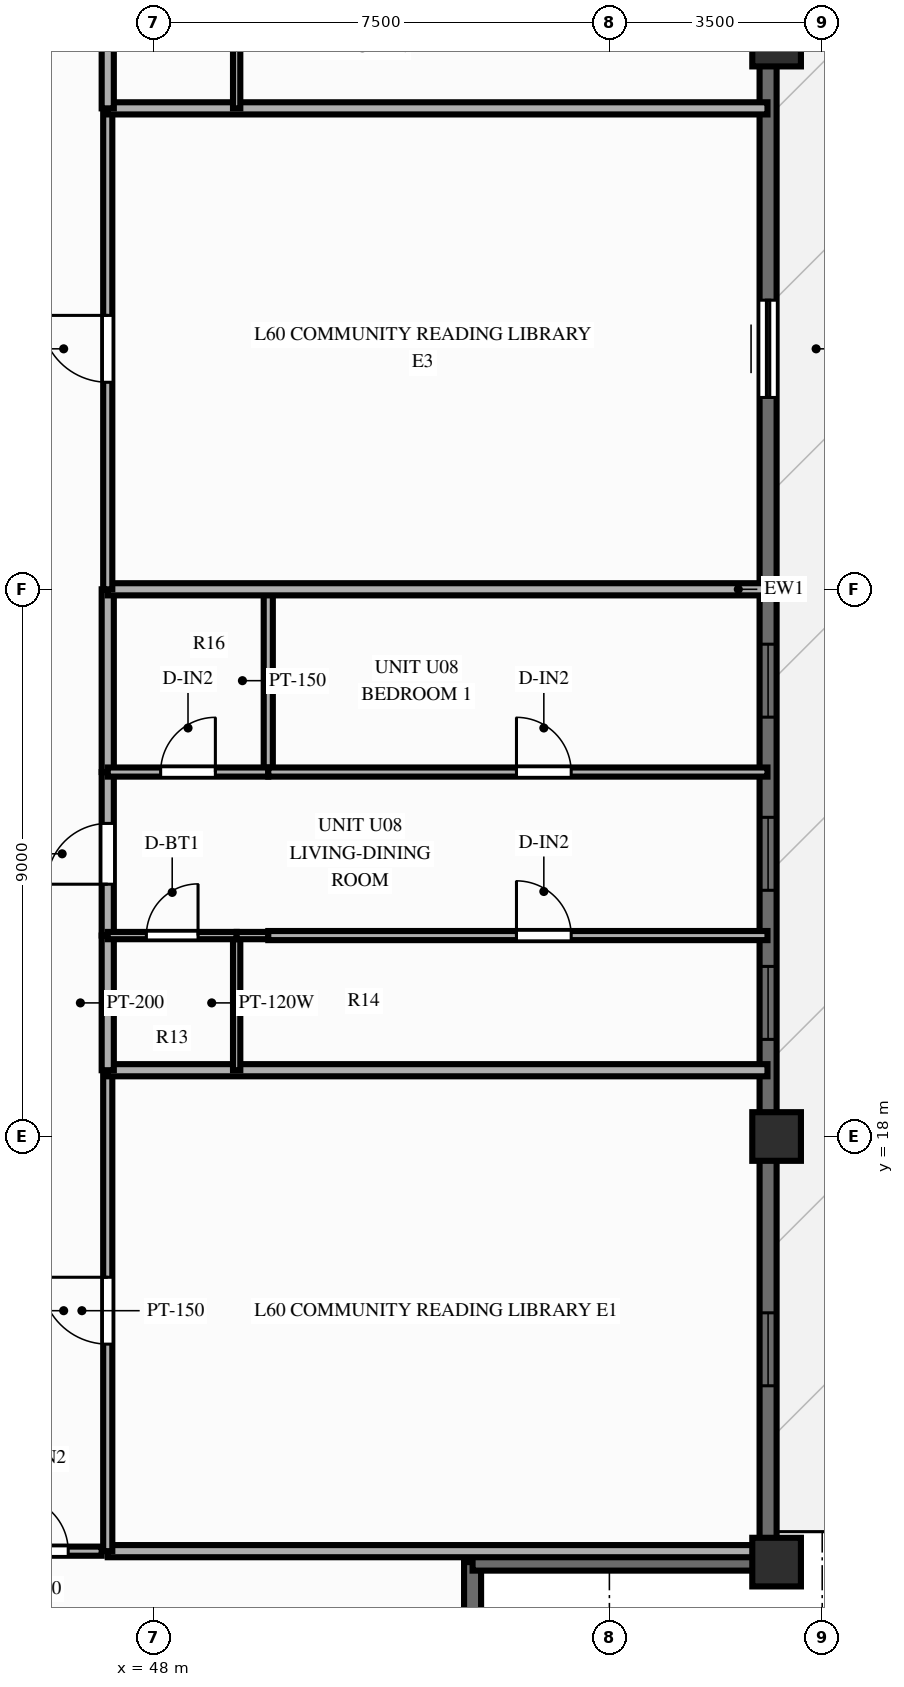
"""IFC4 building model, lengths in metres.
Left out: names, types, materials, properties, quantities, classifications, styles, units other than length and angle.
Written with IfcOpenShell. Run it as: python <this file> out.ifc"""

import sys

from ifc_helpers import new_model, si_unit, direction, frame, frame_2d, origin, origin_2d, place, context, subcontext, project, spatial, rectangle, extrude, source, transform, mapped, element, fill, save


model = new_model("IFC4")
c1 = context("Model", 3, precision=1e-05, world=origin(), true_north=direction((0.0, 1.0)))
c2 = subcontext(c1, "Body", "Model", "MODEL_VIEW")
j1 = project(units=[si_unit("LENGTHUNIT", "METRE"), si_unit("PLANEANGLEUNIT", "RADIAN")], contexts=[c1])
p1 = place(None, origin())
s1 = spatial("IfcSite", under=j1, at=p1, CompositionType="ELEMENT")
p2 = place(p1, origin())
s2 = spatial("IfcBuilding", under=s1, at=p2, CompositionType="ELEMENT")
p3 = place(p2, frame((0.0, 0.0, 192.7)))
s3 = spatial("IfcBuildingStorey", under=s2, at=p3, CompositionType="ELEMENT", Elevation=192.7)
m1 = source(origin(), c2, "Body", "SweptSolid", [
    extrude(rectangle(XDim=0.8, YDim=0.8, at=origin_2d()), origin(), (0.0, 0.0, 1.0), 3.9),
])
for number, where, z_axis, x_axis in (
    (1, (58.25, 11.0, 0.0), (0.0, 0.0, 1.0), (1.0, 0.0, 0.0)),
    (2, (58.25, 18.0, 0.0), (0.0, 0.0, 1.0), (1.0, 0.0, 0.0)),
    (3, (58.25, 36.0, 0.0), (0.0, 0.0, 1.0), (1.0, 0.0, 0.0)),
):
    element("IfcColumn", number, at=place(p3, frame(where, z_axis=z_axis, x_axis=x_axis)), inside=s3, PredefinedType="COLUMN", context=c2, shape_type="MappedRepresentation", body=[
        mapped(m1, transform((0.0, 0.0, 0.0), scale=1.0)),
    ])
p4 = place(p3, frame((58.11, 11.0, 0.0), z_axis=(0.0, 0.0, 1.0), x_axis=(0.0, 1.0, 0.0)))
e4 = element("IfcWall", 4, at=p4, inside=s3, PredefinedType="SOLIDWALL", context=c2, shape_type="SweptSolid", body=[
    extrude(rectangle(XDim=32.0, YDim=0.28, at=frame_2d((16.0, 0.0))), origin(), (0.0, 0.0, 1.0), 2.44),
])
p5 = place(p4, frame((2.9, 0.0, 0.25)))
e5 = element("IfcOpeningElement", 5, at=p5, cuts=e4, PredefinedType="OPENING", context=c2, shape_type="SweptSolid", body=[
    extrude(rectangle(XDim=1.2, YDim=1.5, at=frame_2d((0.6, 0.75))), frame((0.0, 0.152, 0.0), z_axis=(0.0, -1.0, 0.0), x_axis=(1.0, 0.0, 0.0)), (0.0, 0.0, 1.0), 0.304),
])
p6 = place(p4, frame((8.597, 0.0, 0.25)))
e6 = element("IfcOpeningElement", 6, at=p6, cuts=e4, PredefinedType="OPENING", context=c2, shape_type="SweptSolid", body=[
    extrude(rectangle(XDim=1.2, YDim=1.5, at=frame_2d((0.6, 0.75))), frame((0.0, 0.152, 0.0), z_axis=(0.0, -1.0, 0.0), x_axis=(1.0, 0.0, 0.0)), (0.0, 0.0, 1.0), 0.304),
])
p7 = place(p4, frame((11.05, 0.0, 0.25)))
e7 = element("IfcOpeningElement", 7, at=p7, cuts=e4, PredefinedType="OPENING", context=c2, shape_type="SweptSolid", body=[
    extrude(rectangle(XDim=1.2, YDim=1.5, at=frame_2d((0.6, 0.75))), frame((0.0, 0.152, 0.0), z_axis=(0.0, -1.0, 0.0), x_axis=(1.0, 0.0, 0.0)), (0.0, 0.0, 1.0), 0.304),
])
p8 = place(p4, frame((13.897, 0.0, 0.25)))
e8 = element("IfcOpeningElement", 8, at=p8, cuts=e4, PredefinedType="OPENING", context=c2, shape_type="SweptSolid", body=[
    extrude(rectangle(XDim=1.2, YDim=1.5, at=frame_2d((0.6, 0.75))), frame((0.0, 0.152, 0.0), z_axis=(0.0, -1.0, 0.0), x_axis=(1.0, 0.0, 0.0)), (0.0, 0.0, 1.0), 0.304),
])
p9 = place(p4, frame((20.755, 0.0, 0.0), z_axis=(0.0, 0.0, 1.0), x_axis=(-1.0, 0.0, 0.0)))
e9 = element("IfcOpeningElement", 9, at=p9, cuts=e4, PredefinedType="OPENING", context=c2, shape_type="SweptSolid", body=[
    extrude(rectangle(XDim=1.6, YDim=2.15, at=frame_2d((0.8, 1.075))), frame((0.0, 0.152, 0.0), z_axis=(0.0, -1.0, 0.0), x_axis=(1.0, 0.0, 0.0)), (0.0, 0.0, 1.0), 0.304),
])
p10 = place(p4, frame((26.967, 0.0, 0.25)))
e10 = element("IfcOpeningElement", 10, at=p10, cuts=e4, PredefinedType="OPENING", context=c2, shape_type="SweptSolid", body=[
    extrude(rectangle(XDim=1.2, YDim=1.5, at=frame_2d((0.6, 0.75))), frame((0.0, 0.152, 0.0), z_axis=(0.0, -1.0, 0.0), x_axis=(1.0, 0.0, 0.0)), (0.0, 0.0, 1.0), 0.304),
])
p11 = place(p4, frame((29.687, 0.0, 0.25)))
e11 = element("IfcOpeningElement", 11, at=p11, cuts=e4, PredefinedType="OPENING", context=c2, shape_type="SweptSolid", body=[
    extrude(rectangle(XDim=1.2, YDim=1.5, at=frame_2d((0.6, 0.75))), frame((0.0, 0.152, 0.0), z_axis=(0.0, -1.0, 0.0), x_axis=(1.0, 0.0, 0.0)), (0.0, 0.0, 1.0), 0.304),
])
for number, where, z_axis, x_axis in (
    (12, (53.25, 6.08, 0.0), (0.0, 0.0, 1.0), (0.0, 1.0, 0.0)),
    (13, (53.25, 11.0, 0.0), (0.0, 0.0, 1.0), (1.0, 0.0, 0.0)),
):
    element("IfcWall", number, at=place(p3, frame(where, z_axis=z_axis, x_axis=x_axis)), inside=s3, PredefinedType="SOLIDWALL", context=c2, shape_type="SweptSolid", body=[
        extrude(rectangle(XDim=4.92, YDim=0.28, at=frame_2d((2.46, 0.0))), origin(), (0.0, 0.0, 1.0), 2.44),
    ])
p12 = place(p3, frame((44.82, 11.18, 0.0), z_axis=(0.0, 0.0, 1.0), x_axis=(1.0, 0.0, 0.0)))
e14 = element("IfcWall", 14, at=p12, inside=s3, PredefinedType="PARTITIONING", context=c2, shape_type="SweptSolid", body=[
    extrude(rectangle(XDim=2.33, YDim=0.15, at=frame_2d((1.165, 0.0))), origin(), (0.0, 0.0, 1.0), 2.24),
])
p13 = place(p12, frame((0.88, 0.0, 0.0)))
e15 = element("IfcOpeningElement", 15, at=p13, cuts=e14, PredefinedType="OPENING", context=c2, shape_type="SweptSolid", body=[
    extrude(rectangle(XDim=0.9, YDim=2.1, at=frame_2d((0.45, 1.05))), frame((0.0, 0.087, 0.0), z_axis=(0.0, -1.0, 0.0), x_axis=(1.0, 0.0, 0.0)), (0.0, 0.0, 1.0), 0.174),
])
p14 = place(p3, frame((47.25, 11.18, 0.0), z_axis=(0.0, 0.0, 1.0), x_axis=(1.0, 0.0, 0.0)))
e16 = element("IfcWall", 16, at=p14, inside=s3, PredefinedType="PARTITIONING", context=c2, shape_type="SweptSolid", body=[
    extrude(rectangle(XDim=10.85, YDim=0.2, at=frame_2d((5.425, 0.0))), origin(), (0.0, 0.0, 1.0), 2.24),
])
p15 = place(p3, frame((47.25, 11.18, 0.0), z_axis=(0.0, 0.0, 1.0), x_axis=(0.0, 1.0, 0.0)))
e17 = element("IfcWall", 17, at=p15, inside=s3, PredefinedType="PARTITIONING", context=c2, shape_type="SweptSolid", body=[
    extrude(rectangle(XDim=7.91, YDim=0.15, at=frame_2d((3.955, 0.0))), origin(), (0.0, 0.0, 1.0), 3.56),
])
p16 = place(p15, frame((3.405, 0.0, 0.0)))
e18 = element("IfcOpeningElement", 18, at=p16, cuts=e17, PredefinedType="OPENING", context=c2, shape_type="SweptSolid", body=[
    extrude(rectangle(XDim=1.1, YDim=2.15, at=frame_2d((0.55, 1.075))), frame((0.0, 0.087, 0.0), z_axis=(0.0, -1.0, 0.0), x_axis=(1.0, 0.0, 0.0)), (0.0, 0.0, 1.0), 0.174),
])
p17 = place(p3, frame((47.25, 19.09, 0.0), z_axis=(0.0, 0.0, 1.0), x_axis=(1.0, 0.0, 0.0)))
e19 = element("IfcWall", 19, at=p17, inside=s3, PredefinedType="PARTITIONING", context=c2, shape_type="SweptSolid", body=[
    extrude(rectangle(XDim=10.85, YDim=0.2, at=frame_2d((5.425, 0.0))), origin(), (0.0, 0.0, 1.0), 3.56),
])
p18 = place(p3, frame((47.25, 19.09, 0.0), z_axis=(0.0, 0.0, 1.0), x_axis=(0.0, 1.0, 0.0)))
e20 = element("IfcWall", 20, at=p18, inside=s3, PredefinedType="PARTITIONING", context=c2, shape_type="SweptSolid", body=[
    extrude(rectangle(XDim=2.215, YDim=0.2, at=frame_2d((1.107, 0.0))), origin(), (0.0, 0.0, 1.0), 3.56),
])
p19 = place(p3, frame((47.25, 21.305, 0.0), z_axis=(0.0, 0.0, 1.0), x_axis=(0.0, 1.0, 0.0)))
e21 = element("IfcWall", 21, at=p19, inside=s3, PredefinedType="PARTITIONING", context=c2, shape_type="SweptSolid", body=[
    extrude(rectangle(XDim=2.689, YDim=0.2, at=frame_2d((1.345, 0.0))), origin(), (0.0, 0.0, 1.0), 3.56),
])
p20 = place(p19, frame((0.845, 0.0, 0.0)))
e22 = element("IfcOpeningElement", 22, at=p20, cuts=e21, PredefinedType="OPENING", context=c2, shape_type="SweptSolid", body=[
    extrude(rectangle(XDim=1.0, YDim=2.15, at=frame_2d((0.5, 1.075))), frame((0.0, 0.112, 0.0), z_axis=(0.0, -1.0, 0.0), x_axis=(1.0, 0.0, 0.0)), (0.0, 0.0, 1.0), 0.224),
])
p21 = place(p3, frame((47.25, 23.994, 0.0), z_axis=(0.0, 0.0, 1.0), x_axis=(0.0, 1.0, 0.0)))
e23 = element("IfcWall", 23, at=p21, inside=s3, PredefinedType="PARTITIONING", context=c2, shape_type="SweptSolid", body=[
    extrude(rectangle(XDim=3.006, YDim=0.2, at=frame_2d((1.503, 0.0))), origin(), (0.0, 0.0, 1.0), 3.56),
])
p22 = place(p3, frame((49.37, 19.09, 0.0), z_axis=(0.0, 0.0, 1.0), x_axis=(0.0, 1.0, 0.0)))
e24 = element("IfcWall", 24, at=p22, inside=s3, PredefinedType="PARTITIONING", context=c2, shape_type="SweptSolid", body=[
    extrude(rectangle(XDim=2.215, YDim=0.12, at=frame_2d((1.107, 0.0))), origin(), (0.0, 0.0, 1.0), 3.56),
])
p23 = place(p3, frame((49.89, 23.994, 0.0), z_axis=(0.0, 0.0, 1.0), x_axis=(0.0, 1.0, 0.0)))
e25 = element("IfcWall", 25, at=p23, inside=s3, PredefinedType="PARTITIONING", context=c2, shape_type="SweptSolid", body=[
    extrude(rectangle(XDim=3.006, YDim=0.15, at=frame_2d((1.503, 0.0))), origin(), (0.0, 0.0, 1.0), 3.56),
])
p24 = place(p3, frame((47.25, 21.305, 0.0), z_axis=(0.0, 0.0, 1.0), x_axis=(1.0, 0.0, 0.0)))
e26 = element("IfcWall", 26, at=p24, inside=s3, PredefinedType="PARTITIONING", context=c2, shape_type="SweptSolid", body=[
    extrude(rectangle(XDim=2.12, YDim=0.12, at=frame_2d((1.06, 0.0))), origin(), (0.0, 0.0, 1.0), 3.56),
])
p25 = place(p24, frame((0.635, 0.0, 0.0)))
e27 = element("IfcOpeningElement", 27, at=p25, cuts=e26, PredefinedType="OPENING", context=c2, shape_type="SweptSolid", body=[
    extrude(rectangle(XDim=0.85, YDim=2.05, at=frame_2d((0.425, 1.025))), frame((0.0, 0.072, 0.0), z_axis=(0.0, -1.0, 0.0), x_axis=(1.0, 0.0, 0.0)), (0.0, 0.0, 1.0), 0.144),
])
p26 = place(p3, frame((49.37, 21.305, 0.0), z_axis=(0.0, 0.0, 1.0), x_axis=(1.0, 0.0, 0.0)))
e28 = element("IfcWall", 28, at=p26, inside=s3, PredefinedType="PARTITIONING", context=c2, shape_type="SweptSolid", body=[
    extrude(rectangle(XDim=0.52, YDim=0.12, at=frame_2d((0.26, 0.0))), origin(), (0.0, 0.0, 1.0), 3.56),
])
p27 = place(p3, frame((49.89, 21.305, 0.0), z_axis=(0.0, 0.0, 1.0), x_axis=(1.0, 0.0, 0.0)))
e29 = element("IfcWall", 29, at=p27, inside=s3, PredefinedType="PARTITIONING", context=c2, shape_type="SweptSolid", body=[
    extrude(rectangle(XDim=8.21, YDim=0.15, at=frame_2d((4.105, 0.0))), origin(), (0.0, 0.0, 1.0), 3.56),
])
p28 = place(p27, frame((4.082, 0.0, 0.0)))
e30 = element("IfcOpeningElement", 30, at=p28, cuts=e29, PredefinedType="OPENING", context=c2, shape_type="SweptSolid", body=[
    extrude(rectangle(XDim=0.9, YDim=2.1, at=frame_2d((0.45, 1.05))), frame((0.0, 0.087, 0.0), z_axis=(0.0, -1.0, 0.0), x_axis=(1.0, 0.0, 0.0)), (0.0, 0.0, 1.0), 0.174),
])
p29 = place(p3, frame((47.25, 23.994, 0.0), z_axis=(0.0, 0.0, 1.0), x_axis=(1.0, 0.0, 0.0)))
e31 = element("IfcWall", 31, at=p29, inside=s3, PredefinedType="PARTITIONING", context=c2, shape_type="SweptSolid", body=[
    extrude(rectangle(XDim=2.64, YDim=0.15, at=frame_2d((1.32, 0.0))), origin(), (0.0, 0.0, 1.0), 3.56),
])
p30 = place(p29, frame((0.87, 0.0, 0.0)))
e32 = element("IfcOpeningElement", 32, at=p30, cuts=e31, PredefinedType="OPENING", context=c2, shape_type="SweptSolid", body=[
    extrude(rectangle(XDim=0.9, YDim=2.1, at=frame_2d((0.45, 1.05))), frame((0.0, 0.087, 0.0), z_axis=(0.0, -1.0, 0.0), x_axis=(1.0, 0.0, 0.0)), (0.0, 0.0, 1.0), 0.174),
])
p31 = place(p3, frame((49.89, 23.994, 0.0), z_axis=(0.0, 0.0, 1.0), x_axis=(1.0, 0.0, 0.0)))
e33 = element("IfcWall", 33, at=p31, inside=s3, PredefinedType="PARTITIONING", context=c2, shape_type="SweptSolid", body=[
    extrude(rectangle(XDim=8.21, YDim=0.15, at=frame_2d((4.105, 0.0))), origin(), (0.0, 0.0, 1.0), 3.56),
])
p32 = place(p31, frame((4.082, 0.0, 0.0)))
e34 = element("IfcOpeningElement", 34, at=p32, cuts=e33, PredefinedType="OPENING", context=c2, shape_type="SweptSolid", body=[
    extrude(rectangle(XDim=0.9, YDim=2.1, at=frame_2d((0.45, 1.05))), frame((0.0, 0.087, 0.0), z_axis=(0.0, -1.0, 0.0), x_axis=(1.0, 0.0, 0.0)), (0.0, 0.0, 1.0), 0.174),
])
p33 = place(p3, frame((47.25, 27.0, 0.0), z_axis=(0.0, 0.0, 1.0), x_axis=(1.0, 0.0, 0.0)))
e35 = element("IfcWall", 35, at=p33, inside=s3, PredefinedType="PARTITIONING", context=c2, shape_type="SweptSolid", body=[
    extrude(rectangle(XDim=10.85, YDim=0.2, at=frame_2d((5.425, 0.0))), origin(), (0.0, 0.0, 1.0), 3.56),
])
p34 = place(p3, frame((47.25, 27.0, 0.0), z_axis=(0.0, 0.0, 1.0), x_axis=(0.0, 1.0, 0.0)))
e36 = element("IfcWall", 36, at=p34, inside=s3, PredefinedType="PARTITIONING", context=c2, shape_type="SweptSolid", body=[
    extrude(rectangle(XDim=7.91, YDim=0.15, at=frame_2d((3.955, 0.0))), origin(), (0.0, 0.0, 1.0), 3.56),
])
p35 = place(p34, frame((3.405, 0.0, 0.0)))
e37 = element("IfcOpeningElement", 37, at=p35, cuts=e36, PredefinedType="OPENING", context=c2, shape_type="SweptSolid", body=[
    extrude(rectangle(XDim=1.1, YDim=2.15, at=frame_2d((0.55, 1.075))), frame((0.0, 0.087, 0.0), z_axis=(0.0, -1.0, 0.0), x_axis=(1.0, 0.0, 0.0)), (0.0, 0.0, 1.0), 0.174),
])
p36 = place(p3, frame((47.25, 34.91, 0.0), z_axis=(0.0, 0.0, 1.0), x_axis=(1.0, 0.0, 0.0)))
e38 = element("IfcWall", 38, at=p36, inside=s3, PredefinedType="PARTITIONING", context=c2, shape_type="SweptSolid", body=[
    extrude(rectangle(XDim=10.85, YDim=0.2, at=frame_2d((5.425, 0.0))), origin(), (0.0, 0.0, 1.0), 3.56),
])
p37 = place(p3, frame((47.25, 34.91, 0.0), z_axis=(0.0, 0.0, 1.0), x_axis=(0.0, 1.0, 0.0)))
e39 = element("IfcWall", 39, at=p37, inside=s3, PredefinedType="PARTITIONING", context=c2, shape_type="SweptSolid", body=[
    extrude(rectangle(XDim=2.41, YDim=0.2, at=frame_2d((1.205, 0.0))), origin(), (0.0, 0.0, 1.0), 3.56),
])
p38 = place(p3, frame((49.37, 34.91, 0.0), z_axis=(0.0, 0.0, 1.0), x_axis=(0.0, 1.0, 0.0)))
e40 = element("IfcWall", 40, at=p38, inside=s3, PredefinedType="PARTITIONING", context=c2, shape_type="SweptSolid", body=[
    extrude(rectangle(XDim=2.41, YDim=0.12, at=frame_2d((1.205, 0.0))), origin(), (0.0, 0.0, 1.0), 3.56),
])
m2 = source(origin(), c2, "Body", "SweptSolid", [
    extrude(rectangle(XDim=1.2, YDim=1.5, at=frame_2d((0.6, 0.75))), frame((0.0, 0.03, 0.0), z_axis=(0.0, -1.0, 0.0), x_axis=(1.0, 0.0, 0.0)), (0.0, 0.0, 1.0), 0.06),
])
p39 = place(p5, origin())
e41 = element("IfcWindow", 41, at=p39, inside=s3, PartitioningType="SINGLE_PANEL", PredefinedType="WINDOW", context=c2, shape_type="MappedRepresentation", body=[
    mapped(m2, transform((0.0, 0.0, 0.0), scale=1.0)),
])
fill(e5, e41)
p40 = place(p6, origin())
e42 = element("IfcWindow", 42, at=p40, inside=s3, PartitioningType="SINGLE_PANEL", PredefinedType="WINDOW", context=c2, shape_type="MappedRepresentation", body=[
    mapped(m2, transform((0.0, 0.0, 0.0), scale=1.0)),
])
fill(e6, e42)
p41 = place(p7, origin())
e43 = element("IfcWindow", 43, at=p41, inside=s3, PartitioningType="SINGLE_PANEL", PredefinedType="WINDOW", context=c2, shape_type="MappedRepresentation", body=[
    mapped(m2, transform((0.0, 0.0, 0.0), scale=1.0)),
])
fill(e7, e43)
p42 = place(p8, origin())
e44 = element("IfcWindow", 44, at=p42, inside=s3, PartitioningType="SINGLE_PANEL", PredefinedType="WINDOW", context=c2, shape_type="MappedRepresentation", body=[
    mapped(m2, transform((0.0, 0.0, 0.0), scale=1.0)),
])
fill(e8, e44)
m3 = source(origin(), c2, "Body", "SweptSolid", [
    extrude(rectangle(XDim=1.6, YDim=2.15, at=frame_2d((0.8, 1.075))), frame((0.0, 0.025, 0.0), z_axis=(0.0, -1.0, 0.0), x_axis=(1.0, 0.0, 0.0)), (0.0, 0.0, 1.0), 0.05),
])
p43 = place(p9, origin())
e45 = element("IfcDoor", 45, at=p43, inside=s3, OperationType="SLIDING_TO_LEFT", PredefinedType="DOOR", context=c2, shape_type="MappedRepresentation", body=[
    mapped(m3, transform((0.0, 0.0, 0.0), scale=1.0)),
])
fill(e9, e45)
m4 = source(origin(), c2, "Body", "SweptSolid", [
    extrude(rectangle(XDim=0.9, YDim=2.1, at=frame_2d((0.45, 1.05))), frame((0.0, 0.025, 0.0), z_axis=(0.0, -1.0, 0.0), x_axis=(1.0, 0.0, 0.0)), (0.0, 0.0, 1.0), 0.05),
])
p44 = place(p13, origin())
e46 = element("IfcDoor", 46, at=p44, inside=s3, OperationType="SINGLE_SWING_LEFT", PredefinedType="DOOR", context=c2, shape_type="MappedRepresentation", body=[
    mapped(m4, transform((0.0, 0.0, 0.0), scale=1.0)),
])
fill(e15, e46)
m5 = source(origin(), c2, "Body", "SweptSolid", [
    extrude(rectangle(XDim=1.1, YDim=2.15, at=frame_2d((0.55, 1.075))), frame((0.0, 0.025, 0.0), z_axis=(0.0, -1.0, 0.0), x_axis=(1.0, 0.0, 0.0)), (0.0, 0.0, 1.0), 0.05),
])
p45 = place(p16, origin())
e47 = element("IfcDoor", 47, at=p45, inside=s3, OperationType="SINGLE_SWING_RIGHT", PredefinedType="DOOR", context=c2, shape_type="MappedRepresentation", body=[
    mapped(m5, transform((0.0, 0.0, 0.0), scale=1.0)),
])
fill(e18, e47)
m6 = source(origin(), c2, "Body", "SweptSolid", [
    extrude(rectangle(XDim=1.0, YDim=2.15, at=frame_2d((0.5, 1.075))), frame((0.0, 0.025, 0.0), z_axis=(0.0, -1.0, 0.0), x_axis=(1.0, 0.0, 0.0)), (0.0, 0.0, 1.0), 0.05),
])
p46 = place(p20, origin())
e48 = element("IfcDoor", 48, at=p46, inside=s3, OperationType="SINGLE_SWING_LEFT", PredefinedType="DOOR", context=c2, shape_type="MappedRepresentation", body=[
    mapped(m6, transform((0.0, 0.0, 0.0), scale=1.0)),
])
fill(e22, e48)
m7 = source(origin(), c2, "Body", "SweptSolid", [
    extrude(rectangle(XDim=0.85, YDim=2.05, at=frame_2d((0.425, 1.025))), frame((0.0, 0.025, 0.0), z_axis=(0.0, -1.0, 0.0), x_axis=(1.0, 0.0, 0.0)), (0.0, 0.0, 1.0), 0.05),
])
p47 = place(p25, origin())
e49 = element("IfcDoor", 49, at=p47, inside=s3, OperationType="SINGLE_SWING_RIGHT", PredefinedType="DOOR", context=c2, shape_type="MappedRepresentation", body=[
    mapped(m7, transform((0.0, 0.0, 0.0), scale=1.0)),
])
fill(e27, e49)
p48 = place(p28, origin())
e50 = element("IfcDoor", 50, at=p48, inside=s3, OperationType="SINGLE_SWING_LEFT", PredefinedType="DOOR", context=c2, shape_type="MappedRepresentation", body=[
    mapped(m4, transform((0.0, 0.0, 0.0), scale=1.0)),
])
fill(e30, e50)
p49 = place(p30, origin())
e51 = element("IfcDoor", 51, at=p49, inside=s3, OperationType="SINGLE_SWING_RIGHT", PredefinedType="DOOR", context=c2, shape_type="MappedRepresentation", body=[
    mapped(m4, transform((0.0, 0.0, 0.0), scale=1.0)),
])
fill(e32, e51)
p50 = place(p32, origin())
e52 = element("IfcDoor", 52, at=p50, inside=s3, OperationType="SINGLE_SWING_LEFT", PredefinedType="DOOR", context=c2, shape_type="MappedRepresentation", body=[
    mapped(m4, transform((0.0, 0.0, 0.0), scale=1.0)),
])
fill(e34, e52)
p51 = place(p35, origin())
e53 = element("IfcDoor", 53, at=p51, inside=s3, OperationType="SINGLE_SWING_RIGHT", PredefinedType="DOOR", context=c2, shape_type="MappedRepresentation", body=[
    mapped(m5, transform((0.0, 0.0, 0.0), scale=1.0)),
])
fill(e37, e53)
save(model, sys.argv[1])
